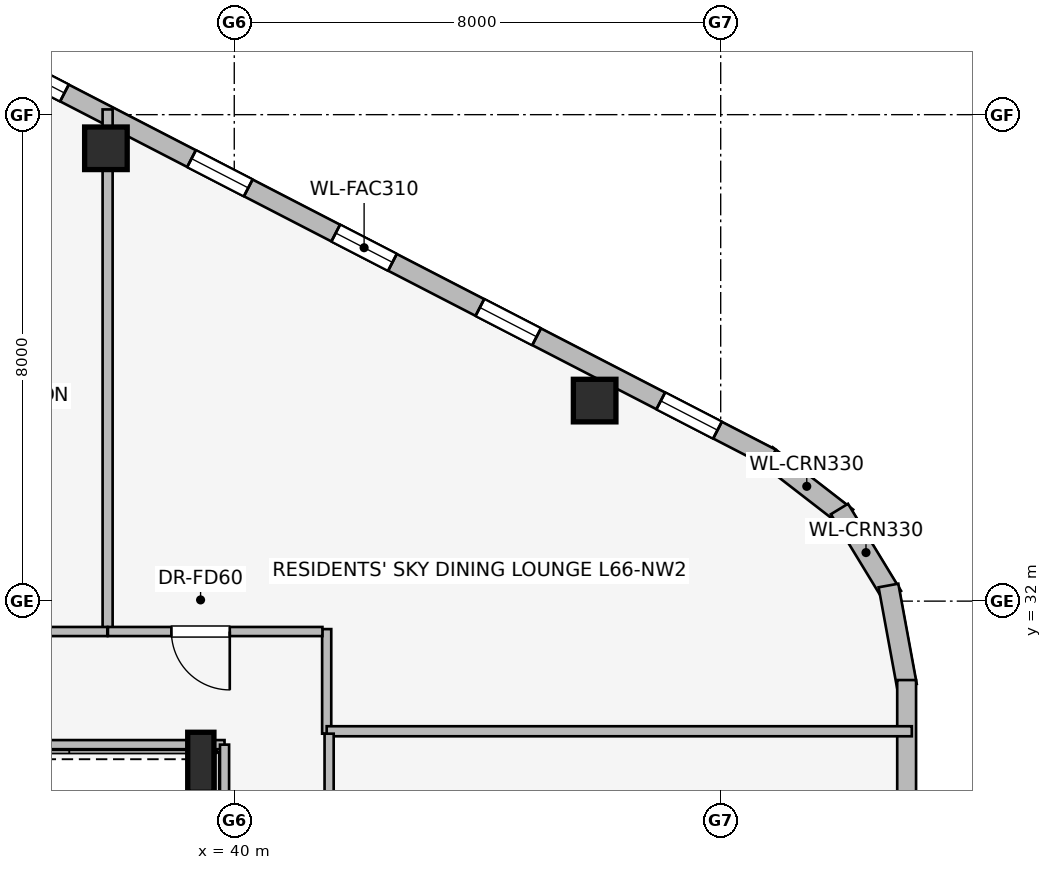
"""IFC4 building model, lengths in metres.
Left out: names, types, materials, properties, quantities, classifications, styles, units other than length and angle.
Written with IfcOpenShell. Run it as: python <this file> out.ifc"""

import sys

from ifc_helpers import new_model, si_unit, direction, frame, frame_2d, origin, origin_2d, place, context, subcontext, project, spatial, rectangle, i_section, extrude, element, fill, save


model = new_model("IFC4")
c1 = context("Model", 3, precision=1e-05, world=origin(), true_north=direction((0.0, 1.0)))
c2 = subcontext(c1, "Body", "Model", "MODEL_VIEW")
j1 = project(units=[si_unit("LENGTHUNIT", "METRE"), si_unit("PLANEANGLEUNIT", "RADIAN")], contexts=[c1])
p1 = place(None, origin())
s1 = spatial("IfcSite", under=j1, at=p1, CompositionType="ELEMENT")
p2 = place(p1, origin())
s2 = spatial("IfcBuilding", under=s1, at=p2, CompositionType="ELEMENT")
p3 = place(p2, frame((0.0, 0.0, 241.9)))
s3 = spatial("IfcBuildingStorey", under=s2, at=p3, CompositionType="ELEMENT", Elevation=241.9)
for number, where, z_axis, x_axis in (
    (1, (45.927, 35.298, 0.0), (0.0, 0.0, 1.0), (1.0, 0.0, 0.0)),
    (2, (37.889, 39.447, 0.0), (0.0, 0.0, 1.0), (1.0, 0.0, 0.0)),
):
    element("IfcColumn", number, at=place(p3, frame(where, z_axis=z_axis, x_axis=x_axis)), inside=s3, PredefinedType="COLUMN", context=c2, shape_type="SweptSolid", body=[
        extrude(rectangle(XDim=0.7, YDim=0.7, at=origin_2d()), origin(), (0.0, 0.0, 1.0), 3.55),
    ])
p4 = place(p3, frame((39.45, 29.35, 0.0), z_axis=(0.0, 0.0, 1.0), x_axis=(1.0, 0.0, 0.0)))
e3 = element("IfcColumn", 3, at=p4, inside=s3, PredefinedType="COLUMN", context=c2, shape_type="SweptSolid", body=[
    extrude(i_section(OverallWidth=0.431, OverallDepth=0.987, WebThickness=0.034, FlangeThickness=0.062, at=origin_2d()), origin(), (0.0, 0.0, 1.0), 3.55),
])
p5 = place(p3, frame((48.753, 34.401, 0.0), z_axis=(0.0, 0.0, 1.0), x_axis=(0.790691856293, -0.61221433207, 0.0)))
e4 = element("IfcWall", 4, at=p5, inside=s3, PredefinedType="STANDARD", context=c2, shape_type="SweptSolid", body=[
    extrude(rectangle(XDim=1.676, YDim=0.33, at=frame_2d((0.838, 0.0))), origin(), (0.0, 0.0, 1.0), 3.29),
])
p6 = place(p3, frame((49.953, 33.515, 0.0), z_axis=(0.0, 0.0, 1.0), x_axis=(0.520325409202, -0.853968072318, 0.0)))
e5 = element("IfcWall", 5, at=p6, inside=s3, PredefinedType="STANDARD", context=c2, shape_type="SweptSolid", body=[
    extrude(rectangle(XDim=1.678, YDim=0.33, at=frame_2d((0.839, 0.0))), origin(), (0.0, 0.0, 1.0), 3.29),
])
p7 = place(p3, frame((50.759, 32.257, 0.0), z_axis=(0.0, 0.0, 1.0), x_axis=(0.180691763044, -0.983539773862, 0.0)))
e6 = element("IfcWall", 6, at=p7, inside=s3, PredefinedType="STANDARD", context=c2, shape_type="SweptSolid", body=[
    extrude(rectangle(XDim=1.677, YDim=0.33, at=frame_2d((0.838, 0.0))), origin(), (0.0, 0.0, 1.0), 3.29),
])
p8 = place(p3, frame((35.437, 41.27, 0.0), z_axis=(0.0, 0.0, 1.0), x_axis=(0.888581481622, -0.458718814218, 0.0)))
e7 = element("IfcWall", 7, at=p8, inside=s3, PredefinedType="STANDARD", context=c2, shape_type="SweptSolid", body=[
    extrude(rectangle(XDim=15.077, YDim=0.31, at=frame_2d((7.539, 0.0))), origin(), (0.0, 0.0, 1.0), 3.29),
])
p9 = place(p8, frame((0.942, 0.0, 0.75)))
e8 = element("IfcOpeningElement", 8, at=p9, cuts=e7, PredefinedType="OPENING", context=c2, shape_type="SweptSolid", body=[
    extrude(rectangle(XDim=1.05, YDim=1.4, at=frame_2d((0.525, 0.7))), frame((0.0, 0.165, 0.0), z_axis=(0.0, -1.0, 0.0), x_axis=(1.0, 0.0, 0.0)), (0.0, 0.0, 1.0), 0.33),
])
p10 = place(p8, frame((4.344, 0.0, 0.75)))
e9 = element("IfcOpeningElement", 9, at=p10, cuts=e7, PredefinedType="OPENING", context=c2, shape_type="SweptSolid", body=[
    extrude(rectangle(XDim=1.05, YDim=1.4, at=frame_2d((0.525, 0.7))), frame((0.0, 0.165, 0.0), z_axis=(0.0, -1.0, 0.0), x_axis=(1.0, 0.0, 0.0)), (0.0, 0.0, 1.0), 0.33),
])
p11 = place(p8, frame((7.013, 0.0, 0.75)))
e10 = element("IfcOpeningElement", 10, at=p11, cuts=e7, PredefinedType="OPENING", context=c2, shape_type="SweptSolid", body=[
    extrude(rectangle(XDim=1.05, YDim=1.4, at=frame_2d((0.525, 0.7))), frame((0.0, 0.165, 0.0), z_axis=(0.0, -1.0, 0.0), x_axis=(1.0, 0.0, 0.0)), (0.0, 0.0, 1.0), 0.33),
])
p12 = place(p8, frame((9.681, 0.0, 0.75)))
e11 = element("IfcOpeningElement", 11, at=p12, cuts=e7, PredefinedType="OPENING", context=c2, shape_type="SweptSolid", body=[
    extrude(rectangle(XDim=1.05, YDim=1.4, at=frame_2d((0.525, 0.7))), frame((0.0, 0.165, 0.0), z_axis=(0.0, -1.0, 0.0), x_axis=(1.0, 0.0, 0.0)), (0.0, 0.0, 1.0), 0.33),
])
p13 = place(p8, frame((13.029, 0.0, 0.75)))
e12 = element("IfcOpeningElement", 12, at=p13, cuts=e7, PredefinedType="OPENING", context=c2, shape_type="SweptSolid", body=[
    extrude(rectangle(XDim=1.05, YDim=1.4, at=frame_2d((0.525, 0.7))), frame((0.0, 0.165, 0.0), z_axis=(0.0, -1.0, 0.0), x_axis=(1.0, 0.0, 0.0)), (0.0, 0.0, 1.0), 0.33),
])
p14 = place(p3, frame((51.058, 30.702, 0.0), z_axis=(0.0, 0.0, 1.0), x_axis=(0.0, -1.0, 0.0)))
e13 = element("IfcWall", 13, at=p14, inside=s3, PredefinedType="STANDARD", context=c2, shape_type="SweptSolid", body=[
    extrude(rectangle(XDim=13.404, YDim=0.31, at=frame_2d((6.702, 0.0))), origin(), (0.0, 0.0, 1.0), 3.29),
])
p15 = place(p14, frame((5.369, 0.0, 0.75)))
e14 = element("IfcOpeningElement", 14, at=p15, cuts=e13, PredefinedType="OPENING", context=c2, shape_type="SweptSolid", body=[
    extrude(rectangle(XDim=1.05, YDim=1.4, at=frame_2d((0.525, 0.7))), frame((0.0, 0.165, 0.0), z_axis=(0.0, -1.0, 0.0), x_axis=(1.0, 0.0, 0.0)), (0.0, 0.0, 1.0), 0.33),
])
p16 = place(p14, frame((6.985, 0.0, 0.75)))
e15 = element("IfcOpeningElement", 15, at=p16, cuts=e13, PredefinedType="OPENING", context=c2, shape_type="SweptSolid", body=[
    extrude(rectangle(XDim=1.05, YDim=1.4, at=frame_2d((0.525, 0.7))), frame((0.0, 0.165, 0.0), z_axis=(0.0, -1.0, 0.0), x_axis=(1.0, 0.0, 0.0)), (0.0, 0.0, 1.0), 0.33),
])
p17 = place(p3, frame((39.84, 29.64, 0.0), z_axis=(0.0, 0.0, 1.0), x_axis=(-1.0, 0.0, 0.0)))
e16 = element("IfcWall", 16, at=p17, inside=s3, PredefinedType="PARTITIONING", context=c2, shape_type="SweptSolid", body=[
    extrude(rectangle(XDim=12.203, YDim=0.15, at=frame_2d((6.102, 0.0))), origin(), (0.0, 0.0, 1.0), 2.431),
])
p18 = place(p3, frame((39.84, 18.36, 0.0), z_axis=(0.0, 0.0, 1.0), x_axis=(0.0, 1.0, 0.0)))
e17 = element("IfcWall", 17, at=p18, inside=s3, PredefinedType="PARTITIONING", context=c2, shape_type="SweptSolid", body=[
    extrude(rectangle(XDim=11.28, YDim=0.15, at=frame_2d((5.64, 0.0))), origin(), (0.0, 0.0, 1.0), 3.29),
])
p19 = place(p3, frame((41.52, 29.82, 0.0), z_axis=(0.0, 0.0, 1.0), x_axis=(0.0, 1.0, 0.0)))
e18 = element("IfcWall", 18, at=p19, inside=s3, PredefinedType="PARTITIONING", context=c2, shape_type="SweptSolid", body=[
    extrude(rectangle(XDim=1.72, YDim=0.15, at=frame_2d((0.86, 0.0))), origin(), (0.0, 0.0, 1.0), 3.29),
])
p20 = place(p3, frame((37.917, 31.51, 0.0), z_axis=(0.0, 0.0, 1.0), x_axis=(0.0, 1.0, 0.0)))
e19 = element("IfcWall", 19, at=p20, inside=s3, PredefinedType="PARTITIONING", context=c2, shape_type="SweptSolid", body=[
    extrude(rectangle(XDim=8.576, YDim=0.165, at=frame_2d((4.288, 0.0))), origin(), (0.0, 0.0, 1.0), 2.679),
])
p21 = place(p3, frame((37.912, 31.5, 0.0), z_axis=(0.0, 0.0, 1.0), x_axis=(-1.0, 0.0, 0.0)))
e20 = element("IfcWall", 20, at=p21, inside=s3, PredefinedType="PARTITIONING", context=c2, shape_type="SweptSolid", body=[
    extrude(rectangle(XDim=3.622, YDim=0.15, at=frame_2d((1.811, 0.0))), origin(), (0.0, 0.0, 1.0), 3.29),
])
p22 = place(p21, frame((1.212, 0.0, 0.0)))
e21 = element("IfcOpeningElement", 21, at=p22, cuts=e20, PredefinedType="OPENING", context=c2, shape_type="SweptSolid", body=[
    extrude(rectangle(XDim=0.96, YDim=2.0, at=frame_2d((0.48, 1.0))), frame((0.0, 0.085, 0.0), z_axis=(0.0, -1.0, 0.0), x_axis=(1.0, 0.0, 0.0)), (0.0, 0.0, 1.0), 0.17),
])
p23 = place(p3, frame((41.45, 31.5, 0.0), z_axis=(0.0, 0.0, 1.0), x_axis=(-1.0, 0.0, 0.0)))
e22 = element("IfcWall", 22, at=p23, inside=s3, PredefinedType="PARTITIONING", context=c2, shape_type="SweptSolid", body=[
    extrude(rectangle(XDim=3.528, YDim=0.15, at=frame_2d((1.764, 0.0))), origin(), (0.0, 0.0, 1.0), 3.29),
])
p24 = place(p23, frame((1.524, 0.0, 0.0)))
e23 = element("IfcOpeningElement", 23, at=p24, cuts=e22, PredefinedType="OPENING", context=c2, shape_type="SweptSolid", body=[
    extrude(rectangle(XDim=0.96, YDim=2.0, at=frame_2d((0.48, 1.0))), frame((0.0, 0.085, 0.0), z_axis=(0.0, -1.0, 0.0), x_axis=(1.0, 0.0, 0.0)), (0.0, 0.0, 1.0), 0.17),
])
p25 = place(p3, frame((41.52, 29.86, 0.0), z_axis=(0.0, 0.0, 1.0), x_axis=(1.0, 0.0, 0.0)))
e24 = element("IfcWall", 24, at=p25, inside=s3, PredefinedType="PARTITIONING", context=c2, shape_type="SweptSolid", body=[
    extrude(rectangle(XDim=9.623, YDim=0.165, at=frame_2d((4.812, 0.0))), origin(), (0.0, 0.0, 1.0), 3.29),
])
p26 = place(p3, frame((41.56, 25.997, 0.0), z_axis=(0.0, 0.0, 1.0), x_axis=(0.0, 1.0, 0.0)))
e25 = element("IfcWall", 25, at=p26, inside=s3, PredefinedType="PARTITIONING", context=c2, shape_type="SweptSolid", body=[
    extrude(rectangle(XDim=3.823, YDim=0.15, at=frame_2d((1.912, 0.0))), origin(), (0.0, 0.0, 1.0), 3.29),
])
p27 = place(p26, frame((1.432, 0.0, 0.0)))
e26 = element("IfcOpeningElement", 26, at=p27, cuts=e25, PredefinedType="OPENING", context=c2, shape_type="SweptSolid", body=[
    extrude(rectangle(XDim=0.96, YDim=2.0, at=frame_2d((0.48, 1.0))), frame((0.0, 0.085, 0.0), z_axis=(0.0, -1.0, 0.0), x_axis=(1.0, 0.0, 0.0)), (0.0, 0.0, 1.0), 0.17),
])
p28 = place(p9, origin())
e27 = element("IfcWindow", 27, at=p28, inside=s3, PartitioningType="SINGLE_PANEL", PredefinedType="WINDOW", context=c2, shape_type="SweptSolid", body=[
    extrude(rectangle(XDim=1.05, YDim=1.4, at=frame_2d((0.525, 0.7))), frame((0.0, 0.03, 0.0), z_axis=(0.0, -1.0, 0.0), x_axis=(1.0, 0.0, 0.0)), (0.0, 0.0, 1.0), 0.06),
])
fill(e8, e27)
p29 = place(p10, origin())
e28 = element("IfcWindow", 28, at=p29, inside=s3, PartitioningType="SINGLE_PANEL", PredefinedType="WINDOW", context=c2, shape_type="SweptSolid", body=[
    extrude(rectangle(XDim=1.05, YDim=1.4, at=frame_2d((0.525, 0.7))), frame((0.0, 0.03, 0.0), z_axis=(0.0, -1.0, 0.0), x_axis=(1.0, 0.0, 0.0)), (0.0, 0.0, 1.0), 0.06),
])
fill(e9, e28)
p30 = place(p11, origin())
e29 = element("IfcWindow", 29, at=p30, inside=s3, PartitioningType="SINGLE_PANEL", PredefinedType="WINDOW", context=c2, shape_type="SweptSolid", body=[
    extrude(rectangle(XDim=1.05, YDim=1.4, at=frame_2d((0.525, 0.7))), frame((0.0, 0.03, 0.0), z_axis=(0.0, -1.0, 0.0), x_axis=(1.0, 0.0, 0.0)), (0.0, 0.0, 1.0), 0.06),
])
fill(e10, e29)
p31 = place(p12, origin())
e30 = element("IfcWindow", 30, at=p31, inside=s3, PartitioningType="SINGLE_PANEL", PredefinedType="WINDOW", context=c2, shape_type="SweptSolid", body=[
    extrude(rectangle(XDim=1.05, YDim=1.4, at=frame_2d((0.525, 0.7))), frame((0.0, 0.03, 0.0), z_axis=(0.0, -1.0, 0.0), x_axis=(1.0, 0.0, 0.0)), (0.0, 0.0, 1.0), 0.06),
])
fill(e11, e30)
p32 = place(p13, origin())
e31 = element("IfcWindow", 31, at=p32, inside=s3, PartitioningType="SINGLE_PANEL", PredefinedType="WINDOW", context=c2, shape_type="SweptSolid", body=[
    extrude(rectangle(XDim=1.05, YDim=1.4, at=frame_2d((0.525, 0.7))), frame((0.0, 0.03, 0.0), z_axis=(0.0, -1.0, 0.0), x_axis=(1.0, 0.0, 0.0)), (0.0, 0.0, 1.0), 0.06),
])
fill(e12, e31)
p33 = place(p24, origin())
e32 = element("IfcDoor", 32, at=p33, inside=s3, OperationType="SINGLE_SWING_LEFT", PredefinedType="DOOR", context=c2, shape_type="SweptSolid", body=[
    extrude(rectangle(XDim=0.96, YDim=2.0, at=frame_2d((0.48, 1.0))), frame((0.0, 0.025, 0.0), z_axis=(0.0, -1.0, 0.0), x_axis=(1.0, 0.0, 0.0)), (0.0, 0.0, 1.0), 0.05),
])
fill(e23, e32)
save(model, sys.argv[1])
